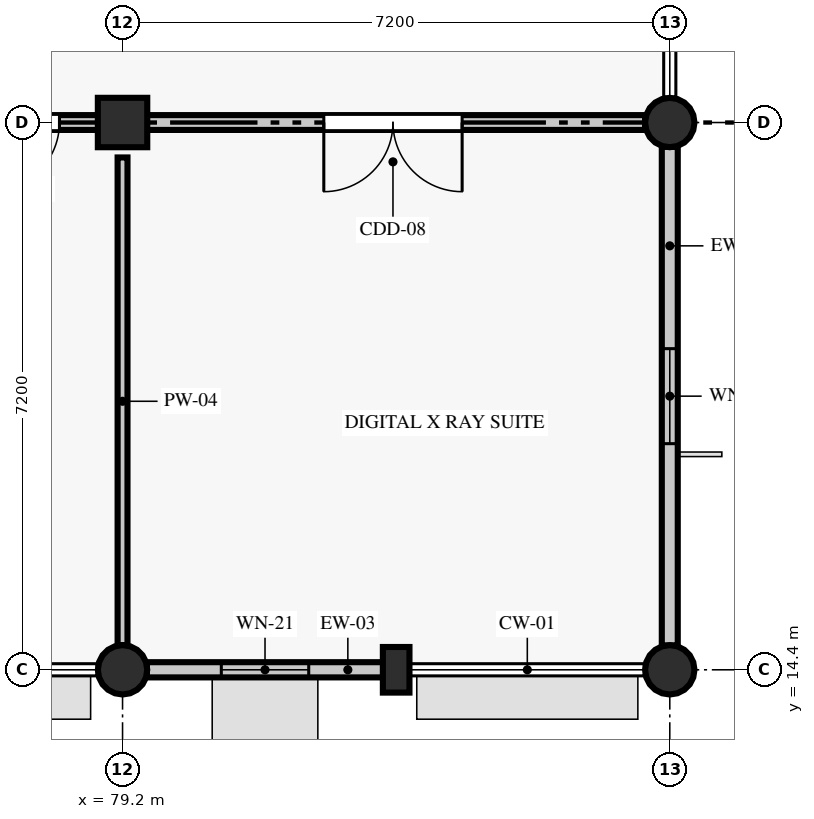
"""IFC4 building model, lengths in metres.
Left out: names, types, materials, properties, quantities, classifications, styles, units other than length and angle.
Written with IfcOpenShell. Run it as: python <this file> out.ifc"""

import sys

from ifc_helpers import new_model, si_unit, direction, frame, frame_2d, origin, origin_2d, place, context, subcontext, project, spatial, rectangle, circle, extrude, element, fill, save


model = new_model("IFC4")
c1 = context("Model", 3, precision=1e-05, world=origin(), true_north=direction((0.0, 1.0)))
c2 = subcontext(c1, "Body", "Model", "MODEL_VIEW")
j1 = project(units=[si_unit("LENGTHUNIT", "METRE"), si_unit("PLANEANGLEUNIT", "RADIAN")], contexts=[c1])
p1 = place(None, origin())
s1 = spatial("IfcSite", under=j1, at=p1, CompositionType="ELEMENT")
p2 = place(p1, origin())
s2 = spatial("IfcBuilding", under=s1, at=p2, CompositionType="ELEMENT")
p3 = place(p2, frame((0.0, 0.0, 4.8)))
s3 = spatial("IfcBuildingStorey", under=s2, at=p3, CompositionType="ELEMENT", Elevation=4.8)
p4 = place(p3, frame((79.2, 14.4, 0.0), z_axis=(0.0, 0.0, 1.0), x_axis=(1.0, 0.0, 0.0)))
e1 = element("IfcColumn", 1, at=p4, inside=s3, PredefinedType="COLUMN", context=c2, shape_type="SweptSolid", body=[
    extrude(circle(Radius=0.325, at=origin_2d()), origin(), (0.0, 0.0, 1.0), 4.505),
])
p5 = place(p3, frame((79.2, 21.6, 0.0), z_axis=(0.0, 0.0, 1.0), x_axis=(1.0, 0.0, 0.0)))
e2 = element("IfcColumn", 2, at=p5, inside=s3, PredefinedType="COLUMN", context=c2, shape_type="SweptSolid", body=[
    extrude(rectangle(XDim=0.65, YDim=0.65, at=origin_2d()), origin(), (0.0, 0.0, 1.0), 4.505),
])
for number, where, z_axis, x_axis in (
    (3, (86.4, 14.4, 0.0), (0.0, 0.0, 1.0), (1.0, 0.0, 0.0)),
    (4, (86.4, 21.6, 0.0), (0.0, 0.0, 1.0), (1.0, 0.0, 0.0)),
):
    element("IfcColumn", number, at=place(p3, frame(where, z_axis=z_axis, x_axis=x_axis)), inside=s3, PredefinedType="COLUMN", context=c2, shape_type="SweptSolid", body=[
        extrude(circle(Radius=0.325, at=origin_2d()), origin(), (0.0, 0.0, 1.0), 4.505),
    ])
p6 = place(p3, frame((82.8, 14.4, 0.0), z_axis=(0.0, 0.0, 1.0), x_axis=(1.0, 0.0, 0.0)))
e5 = element("IfcColumn", 5, at=p6, inside=s3, PredefinedType="PILASTER", context=c2, shape_type="SweptSolid", body=[
    extrude(rectangle(XDim=0.35, YDim=0.6, at=origin_2d()), origin(), (0.0, 0.0, 1.0), 4.505),
])
p7 = place(p3, frame((79.52, 14.4, 0.0), z_axis=(0.0, 0.0, 1.0), x_axis=(1.0, 0.0, 0.0)))
e6 = element("IfcWall", 6, at=p7, inside=s3, PredefinedType="STANDARD", context=c2, shape_type="SweptSolid", body=[
    extrude(rectangle(XDim=3.109, YDim=0.2, at=frame_2d((1.554, 0.0))), origin(), (0.0, 0.0, 1.0), 3.855),
])
p8 = place(p7, frame((0.979, 0.0, 0.9)))
e7 = element("IfcOpeningElement", 7, at=p8, cuts=e6, PredefinedType="OPENING", context=c2, shape_type="SweptSolid", body=[
    extrude(rectangle(XDim=1.15, YDim=1.54, at=frame_2d((0.575, 0.77))), frame((0.0, 0.11, 0.0), z_axis=(0.0, -1.0, 0.0), x_axis=(1.0, 0.0, 0.0)), (0.0, 0.0, 1.0), 0.22),
])
p9 = place(p3, frame((86.4, 14.72, 0.0), z_axis=(0.0, 0.0, 1.0), x_axis=(0.0, 1.0, 0.0)))
e8 = element("IfcWall", 8, at=p9, inside=s3, PredefinedType="STANDARD", context=c2, shape_type="SweptSolid", body=[
    extrude(rectangle(XDim=6.56, YDim=0.21, at=frame_2d((3.28, 0.0))), origin(), (0.0, 0.0, 1.0), 3.855),
])
p10 = place(p9, frame((2.655, 0.0, 0.9)))
e9 = element("IfcOpeningElement", 9, at=p10, cuts=e8, PredefinedType="OPENING", context=c2, shape_type="SweptSolid", body=[
    extrude(rectangle(XDim=1.25, YDim=1.54, at=frame_2d((0.625, 0.77))), frame((0.0, 0.115, 0.0), z_axis=(0.0, -1.0, 0.0), x_axis=(1.0, 0.0, 0.0)), (0.0, 0.0, 1.0), 0.23),
])
p11 = place(p3, frame((50.725, 21.6, 0.0), z_axis=(0.0, 0.0, 1.0), x_axis=(1.0, 0.0, 0.0)))
e10 = element("IfcWall", 10, at=p11, inside=s3, PredefinedType="PARTITIONING", context=c2, shape_type="SweptSolid", body=[
    extrude(rectangle(XDim=35.35, YDim=0.195, at=frame_2d((17.675, 0.0))), origin(), (0.0, 0.0, 1.0), 3.655),
])
p12 = place(p11, frame((2.752, 0.0, 0.0)))
e11 = element("IfcOpeningElement", 11, at=p12, cuts=e10, PredefinedType="OPENING", context=c2, shape_type="SweptSolid", body=[
    extrude(rectangle(XDim=1.54, YDim=2.2, at=frame_2d((0.77, 1.1))), frame((0.0, 0.107, 0.0), z_axis=(0.0, -1.0, 0.0), x_axis=(1.0, 0.0, 0.0)), (0.0, 0.0, 1.0), 0.215),
])
p13 = place(p11, frame((8.569, 0.0, 0.0)))
e12 = element("IfcOpeningElement", 12, at=p13, cuts=e10, PredefinedType="OPENING", context=c2, shape_type="SweptSolid", body=[
    extrude(rectangle(XDim=1.62, YDim=2.22, at=frame_2d((0.81, 1.11))), frame((0.0, 0.107, 0.0), z_axis=(0.0, -1.0, 0.0), x_axis=(1.0, 0.0, 0.0)), (0.0, 0.0, 1.0), 0.215),
])
p14 = place(p11, frame((11.259, 0.0, 0.0)))
e13 = element("IfcOpeningElement", 13, at=p14, cuts=e10, PredefinedType="OPENING", context=c2, shape_type="SweptSolid", body=[
    extrude(rectangle(XDim=0.9, YDim=2.08, at=frame_2d((0.45, 1.04))), frame((0.0, 0.107, 0.0), z_axis=(0.0, -1.0, 0.0), x_axis=(1.0, 0.0, 0.0)), (0.0, 0.0, 1.0), 0.215),
])
p15 = place(p11, frame((16.6, 0.0, 0.0)))
e14 = element("IfcOpeningElement", 14, at=p15, cuts=e10, PredefinedType="OPENING", context=c2, shape_type="SweptSolid", body=[
    extrude(rectangle(XDim=1.74, YDim=2.26, at=frame_2d((0.87, 1.13))), frame((0.0, 0.107, 0.0), z_axis=(0.0, -1.0, 0.0), x_axis=(1.0, 0.0, 0.0)), (0.0, 0.0, 1.0), 0.215),
])
p16 = place(p11, frame((22.255, 0.0, 0.0)))
e15 = element("IfcOpeningElement", 15, at=p16, cuts=e10, PredefinedType="OPENING", context=c2, shape_type="SweptSolid", body=[
    extrude(rectangle(XDim=0.92, YDim=2.18, at=frame_2d((0.46, 1.09))), frame((0.0, 0.107, 0.0), z_axis=(0.0, -1.0, 0.0), x_axis=(1.0, 0.0, 0.0)), (0.0, 0.0, 1.0), 0.215),
])
p17 = place(p11, frame((24.455, 0.0, 0.0)))
e16 = element("IfcOpeningElement", 16, at=p17, cuts=e10, PredefinedType="OPENING", context=c2, shape_type="SweptSolid", body=[
    extrude(rectangle(XDim=0.94, YDim=2.08, at=frame_2d((0.47, 1.04))), frame((0.0, 0.107, 0.0), z_axis=(0.0, -1.0, 0.0), x_axis=(1.0, 0.0, 0.0)), (0.0, 0.0, 1.0), 0.215),
])
p18 = place(p11, frame((26.745, 0.0, 0.0)))
e17 = element("IfcOpeningElement", 17, at=p18, cuts=e10, PredefinedType="OPENING", context=c2, shape_type="SweptSolid", body=[
    extrude(rectangle(XDim=0.9, YDim=2.08, at=frame_2d((0.45, 1.04))), frame((0.0, 0.107, 0.0), z_axis=(0.0, -1.0, 0.0), x_axis=(1.0, 0.0, 0.0)), (0.0, 0.0, 1.0), 0.215),
])
p19 = place(p11, frame((31.123, 0.0, 0.0)))
e18 = element("IfcOpeningElement", 18, at=p19, cuts=e10, PredefinedType="OPENING", context=c2, shape_type="SweptSolid", body=[
    extrude(rectangle(XDim=1.82, YDim=2.26, at=frame_2d((0.91, 1.13))), frame((0.0, 0.107, 0.0), z_axis=(0.0, -1.0, 0.0), x_axis=(1.0, 0.0, 0.0)), (0.0, 0.0, 1.0), 0.215),
])
p20 = place(p3, frame((79.2, 14.725, 0.0), z_axis=(0.0, 0.0, 1.0), x_axis=(0.0, 1.0, 0.0)))
e19 = element("IfcWall", 19, at=p20, inside=s3, PredefinedType="PARTITIONING", context=c2, shape_type="SweptSolid", body=[
    extrude(rectangle(XDim=6.415, YDim=0.13, at=frame_2d((3.208, 0.0))), origin(), (0.0, 0.0, 1.0), 3.905),
])
p21 = place(p8, origin())
e20 = element("IfcWindow", 20, at=p21, inside=s3, PartitioningType="SINGLE_PANEL", PredefinedType="WINDOW", context=c2, shape_type="SweptSolid", body=[
    extrude(rectangle(XDim=1.15, YDim=1.54, at=frame_2d((0.575, 0.77))), frame((0.0, 0.03, 0.0), z_axis=(0.0, -1.0, 0.0), x_axis=(1.0, 0.0, 0.0)), (0.0, 0.0, 1.0), 0.06),
])
fill(e7, e20)
p22 = place(p10, origin())
e21 = element("IfcWindow", 21, at=p22, inside=s3, PartitioningType="SINGLE_PANEL", PredefinedType="WINDOW", context=c2, shape_type="SweptSolid", body=[
    extrude(rectangle(XDim=1.25, YDim=1.54, at=frame_2d((0.625, 0.77))), frame((0.0, 0.03, 0.0), z_axis=(0.0, -1.0, 0.0), x_axis=(1.0, 0.0, 0.0)), (0.0, 0.0, 1.0), 0.06),
])
fill(e9, e21)
p23 = place(p18, frame((0.9, 0.0, 0.0), z_axis=(0.0, 0.0, 1.0), x_axis=(-1.0, 0.0, 0.0)))
e22 = element("IfcDoor", 22, at=p23, inside=s3, OperationType="SINGLE_SWING_RIGHT", PredefinedType="DOOR", context=c2, shape_type="SweptSolid", body=[
    extrude(rectangle(XDim=0.9, YDim=2.08, at=frame_2d((0.45, 1.04))), frame((0.0, 0.025, 0.0), z_axis=(0.0, -1.0, 0.0), x_axis=(1.0, 0.0, 0.0)), (0.0, 0.0, 1.0), 0.05),
])
fill(e17, e22)
p24 = place(p19, frame((1.82, 0.0, 0.0), z_axis=(0.0, 0.0, 1.0), x_axis=(-1.0, 0.0, 0.0)))
e23 = element("IfcDoor", 23, at=p24, inside=s3, OperationType="DOUBLE_DOOR_SINGLE_SWING", PredefinedType="DOOR", context=c2, shape_type="SweptSolid", body=[
    extrude(rectangle(XDim=1.82, YDim=2.26, at=frame_2d((0.91, 1.13))), frame((0.0, 0.025, 0.0), z_axis=(0.0, -1.0, 0.0), x_axis=(1.0, 0.0, 0.0)), (0.0, 0.0, 1.0), 0.05),
])
fill(e18, e23)
save(model, sys.argv[1])
